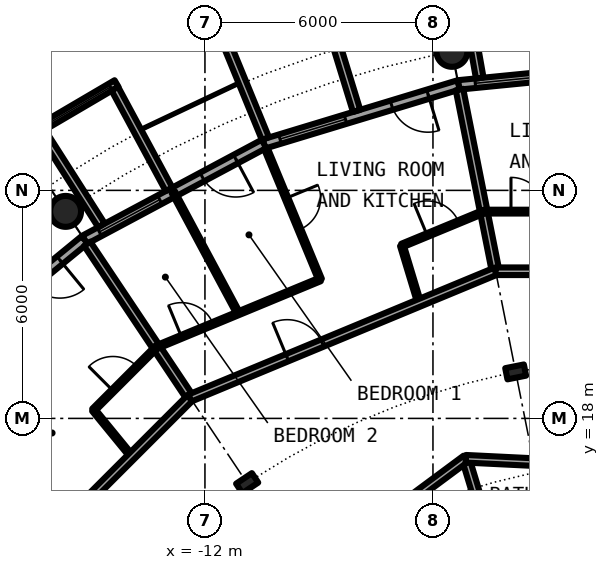
"""IFC4 building model, lengths in metres.
Left out: names, types, materials, properties, quantities, classifications, styles, units other than length and angle.
Written with IfcOpenShell. Run it as: python <this file> out.ifc"""

import sys

from ifc_helpers import new_model, si_unit, direction, frame, frame_2d, origin, origin_2d, place, context, subcontext, project, spatial, rectangle, circle, hollow_circle, i_section, extrude, element, fill, save


model = new_model("IFC4")
c1 = context("Model", 3, precision=1e-05, world=origin(), true_north=direction((0.0, 1.0)))
c2 = subcontext(c1, "Body", "Model", "MODEL_VIEW")
j1 = project(units=[si_unit("LENGTHUNIT", "METRE"), si_unit("PLANEANGLEUNIT", "RADIAN")], contexts=[c1])
p1 = place(None, origin())
s1 = spatial("IfcSite", under=j1, at=p1, CompositionType="ELEMENT")
p2 = place(p1, origin())
s2 = spatial("IfcBuilding", under=s1, at=p2, CompositionType="ELEMENT")
p3 = place(p2, frame((0.0, 0.0, 170.75)))
s3 = spatial("IfcBuildingStorey", under=s2, at=p3, CompositionType="ELEMENT", Elevation=170.75)
for number, where, z_axis, x_axis in (
    (1, (-5.501, 27.658, 0.0), (0.0, 0.0, 1.0), (1.0, 0.0, 0.0)),
    (2, (-15.667, 23.448, 0.0), (0.0, 0.0, 1.0), (1.0, 0.0, 0.0)),
):
    element("IfcColumn", number, at=place(p3, frame(where, z_axis=z_axis, x_axis=x_axis)), inside=s3, PredefinedType="COLUMN", context=c2, shape_type="SweptSolid", body=[
        extrude(hollow_circle(Radius=0.406, WallThickness=0.04, at=origin_2d()), origin(), (0.0, 0.0, 1.0), 3.05),
    ])
for number, where, z_axis, x_axis in (
    (3, (-3.824, 19.223, 0.0), (0.0, 0.0, 1.0), (-0.195, 0.981, 0.0)),
    (4, (-10.889, 16.297, 0.0), (0.0, 0.0, 1.0), (-0.556, 0.831, 0.0)),
):
    element("IfcColumn", number, at=place(p3, frame(where, z_axis=z_axis, x_axis=x_axis)), inside=s3, PredefinedType="COLUMN", context=c2, shape_type="SweptSolid", body=[
        extrude(i_section(OverallWidth=0.3, OverallDepth=0.5, WebThickness=0.014, FlangeThickness=0.028, FilletRadius=0.027, at=origin_2d()), origin(), (0.0, 0.0, 1.0), 3.05),
    ])
p4 = place(p3, frame((0.0, 27.3, 0.0), z_axis=(0.0, 0.0, 1.0), x_axis=(-0.995173996315, -0.098126026407, 0.0)))
e5 = element("IfcWall", 5, at=p4, inside=s3, PredefinedType="SOLIDWALL", context=c2, shape_type="SweptSolid", body=[
    extrude(rectangle(XDim=5.352, YDim=0.25, at=frame_2d((2.676, 0.0))), origin(), (0.0, 0.0, 1.0), 2.7),
])
p5 = place(p4, frame((0.841, 0.0, 0.0)))
e6 = element("IfcOpeningElement", 6, at=p5, cuts=e5, PredefinedType="OPENING", context=c2, shape_type="SweptSolid", body=[
    extrude(rectangle(XDim=1.0, YDim=2.2, at=frame_2d((0.5, 1.1))), frame((0.0, 0.135, 0.0), z_axis=(0.0, -1.0, 0.0), x_axis=(1.0, 0.0, 0.0)), (0.0, 0.0, 1.0), 0.27),
])
p6 = place(p4, frame((3.111, 0.0, 0.3)))
e7 = element("IfcOpeningElement", 7, at=p6, cuts=e5, PredefinedType="OPENING", context=c2, shape_type="SweptSolid", body=[
    extrude(rectangle(XDim=1.8, YDim=2.1, at=frame_2d((0.9, 1.05))), frame((0.0, 0.135, 0.0), z_axis=(0.0, -1.0, 0.0), x_axis=(1.0, 0.0, 0.0)), (0.0, 0.0, 1.0), 0.27),
])
p7 = place(p3, frame((-4.769, 26.956, -0.03), z_axis=(0.0, 0.0, 1.0), x_axis=(-0.174056778901, 0.984735618183, 0.0)))
e8 = element("IfcWall", 8, at=p7, inside=s3, PredefinedType="SOLIDWALL", context=c2, shape_type="SweptSolid", body=[
    extrude(rectangle(XDim=2.925, YDim=0.2, at=frame_2d((1.462, 0.0))), origin(), (0.0, 0.0, 1.0), 2.73),
])
p8 = place(p3, frame((-5.326, 26.775, 0.0), z_axis=(0.0, 0.0, 1.0), x_axis=(-0.956965678721, -0.290201119486, 0.0)))
e9 = element("IfcWall", 9, at=p8, inside=s3, PredefinedType="SOLIDWALL", context=c2, shape_type="SweptSolid", body=[
    extrude(rectangle(XDim=5.351, YDim=0.25, at=frame_2d((2.676, 0.0))), origin(), (0.0, 0.0, 1.0), 2.7),
])
p9 = place(p8, frame((0.841, 0.0, 0.0)))
e10 = element("IfcOpeningElement", 10, at=p9, cuts=e9, PredefinedType="OPENING", context=c2, shape_type="SweptSolid", body=[
    extrude(rectangle(XDim=1.0, YDim=2.2, at=frame_2d((0.5, 1.1))), frame((0.0, 0.135, 0.0), z_axis=(0.0, -1.0, 0.0), x_axis=(1.0, 0.0, 0.0)), (0.0, 0.0, 1.0), 0.27),
])
p10 = place(p8, frame((3.111, 0.0, 0.3)))
e11 = element("IfcOpeningElement", 11, at=p10, cuts=e9, PredefinedType="OPENING", context=c2, shape_type="SweptSolid", body=[
    extrude(rectangle(XDim=1.8, YDim=2.1, at=frame_2d((0.9, 1.05))), frame((0.0, 0.135, 0.0), z_axis=(0.0, -1.0, 0.0), x_axis=(1.0, 0.0, 0.0)), (0.0, 0.0, 1.0), 0.27),
])
p11 = place(p3, frame((-8.009, 26.092, -0.03), z_axis=(0.0, 0.0, 1.0), x_axis=(-0.293406695073, 0.955987715029, 0.0)))
e12 = element("IfcWall", 12, at=p11, inside=s3, PredefinedType="SOLIDWALL", context=c2, shape_type="SweptSolid", body=[
    extrude(rectangle(XDim=3.006, YDim=0.2, at=frame_2d((1.503, 0.0))), origin(), (0.0, 0.0, 1.0), 2.73),
])
p12 = place(p3, frame((-10.409, 25.364, -0.03), z_axis=(0.0, 0.0, 1.0), x_axis=(-0.379509886562, 0.925187681501, 0.0)))
e13 = element("IfcWall", 13, at=p12, inside=s3, PredefinedType="SOLIDWALL", context=c2, shape_type="SweptSolid", body=[
    extrude(rectangle(XDim=2.883, YDim=0.2, at=frame_2d((1.441, 0.0))), origin(), (0.0, 0.0, 1.0), 2.73),
])
p13 = place(p3, frame((-10.447, 25.222, 0.0), z_axis=(0.0, 0.0, 1.0), x_axis=(-0.881915646801, -0.471407246368, 0.0)))
e14 = element("IfcWall", 14, at=p13, inside=s3, PredefinedType="SOLIDWALL", context=c2, shape_type="SweptSolid", body=[
    extrude(rectangle(XDim=5.352, YDim=0.25, at=frame_2d((2.676, 0.0))), origin(), (0.0, 0.0, 1.0), 2.7),
])
p14 = place(p13, frame((0.841, 0.0, 0.0)))
e15 = element("IfcOpeningElement", 15, at=p14, cuts=e14, PredefinedType="OPENING", context=c2, shape_type="SweptSolid", body=[
    extrude(rectangle(XDim=1.0, YDim=2.2, at=frame_2d((0.5, 1.1))), frame((0.0, 0.135, 0.0), z_axis=(0.0, -1.0, 0.0), x_axis=(1.0, 0.0, 0.0)), (0.0, 0.0, 1.0), 0.27),
])
p15 = place(p13, frame((3.111, 0.0, 0.3)))
e16 = element("IfcOpeningElement", 16, at=p15, cuts=e14, PredefinedType="OPENING", context=c2, shape_type="SweptSolid", body=[
    extrude(rectangle(XDim=1.8, YDim=2.1, at=frame_2d((0.9, 1.05))), frame((0.0, 0.135, 0.0), z_axis=(0.0, -1.0, 0.0), x_axis=(1.0, 0.0, 0.0)), (0.0, 0.0, 1.0), 0.27),
])
p16 = place(p3, frame((-14.327, 26.812, -0.03), z_axis=(0.0, 0.0, 1.0), x_axis=(-0.862403467503, -0.506221551535, 0.0)))
e17 = element("IfcWall", 17, at=p16, inside=s3, PredefinedType="SOLIDWALL", context=c2, shape_type="SweptSolid", body=[
    extrude(rectangle(XDim=2.446, YDim=0.2, at=frame_2d((1.223, 0.0))), origin(), (0.0, 0.0, 1.0), 2.73),
])
p17 = place(p16, frame((0.183, 0.0, 0.33)))
e18 = element("IfcOpeningElement", 18, at=p17, cuts=e17, PredefinedType="OPENING", context=c2, shape_type="SweptSolid", body=[
    extrude(circle(Radius=1.04, at=frame_2d((1.04, 1.04))), frame((0.0, 0.11, 0.0), z_axis=(0.0, -1.0, 0.0), x_axis=(1.0, 0.0, 0.0)), (0.0, 0.0, 1.0), 0.22),
])
p18 = place(p3, frame((-12.945, 24.029, -0.03), z_axis=(0.0, 0.0, 1.0), x_axis=(-0.474424310775, 0.88029629861, 0.0)))
e19 = element("IfcWall", 19, at=p18, inside=s3, PredefinedType="SOLIDWALL", context=c2, shape_type="SweptSolid", body=[
    extrude(rectangle(XDim=3.006, YDim=0.2, at=frame_2d((1.503, 0.0))), origin(), (0.0, 0.0, 1.0), 2.73),
])
p19 = place(p3, frame((-14.722, 23.079, -0.03), z_axis=(0.0, 0.0, 1.0), x_axis=(-0.537572179146, 0.843217737129, 0.0)))
e20 = element("IfcWall", 20, at=p19, inside=s3, PredefinedType="SOLIDWALL", context=c2, shape_type="SweptSolid", body=[
    extrude(rectangle(XDim=2.924, YDim=0.2, at=frame_2d((1.462, 0.0))), origin(), (0.0, 0.0, 1.0), 2.73),
])
p20 = place(p3, frame((-15.167, 22.699, 0.0), z_axis=(0.0, 0.0, 1.0), x_axis=(-0.773019449054, -0.634382322723, 0.0)))
e21 = element("IfcWall", 21, at=p20, inside=s3, PredefinedType="SOLIDWALL", context=c2, shape_type="SweptSolid", body=[
    extrude(rectangle(XDim=5.352, YDim=0.25, at=frame_2d((2.676, 0.0))), origin(), (0.0, 0.0, 1.0), 2.7),
])
p21 = place(p20, frame((0.841, 0.0, 0.0)))
e22 = element("IfcOpeningElement", 22, at=p21, cuts=e21, PredefinedType="OPENING", context=c2, shape_type="SweptSolid", body=[
    extrude(rectangle(XDim=1.0, YDim=2.2, at=frame_2d((0.5, 1.1))), frame((0.0, 0.135, 0.0), z_axis=(0.0, -1.0, 0.0), x_axis=(1.0, 0.0, 0.0)), (0.0, 0.0, 1.0), 0.27),
])
p22 = place(p20, frame((3.111, 0.0, 0.3)))
e23 = element("IfcOpeningElement", 23, at=p22, cuts=e21, PredefinedType="OPENING", context=c2, shape_type="SweptSolid", body=[
    extrude(rectangle(XDim=1.8, YDim=2.1, at=frame_2d((0.9, 1.05))), frame((0.0, 0.135, 0.0), z_axis=(0.0, -1.0, 0.0), x_axis=(1.0, 0.0, 0.0)), (0.0, 0.0, 1.0), 0.27),
])
p23 = place(p3, frame((-15.098, 22.595, 0.0), z_axis=(0.0, 0.0, 1.0), x_axis=(0.55569370664, -0.831387096605, 0.0)))
e24 = element("IfcWall", 24, at=p23, inside=s3, PredefinedType="PARTITIONING", context=c2, shape_type="SweptSolid", body=[
    extrude(rectangle(XDim=4.875, YDim=0.2, at=frame_2d((2.438, 0.0))), origin(), (0.0, 0.0, 1.0), 2.7),
])
p24 = place(p3, frame((-14.93, 18.222, 0.0), z_axis=(0.0, 0.0, 1.0), x_axis=(0.633633636523, -0.773633255921, 0.0)))
e25 = element("IfcWall", 25, at=p24, inside=s3, PredefinedType="PARTITIONING", context=c2, shape_type="SweptSolid", body=[
    extrude(rectangle(XDim=1.578, YDim=0.1, at=frame_2d((0.789, 0.0))), origin(), (0.0, 0.0, 1.0), 2.7),
])
p25 = place(p3, frame((-12.833, 23.954, 0.0), z_axis=(0.0, 0.0, 1.0), x_axis=(0.472212052488, -0.881484984265, 0.0)))
e26 = element("IfcWall", 26, at=p25, inside=s3, PredefinedType="PARTITIONING", context=c2, shape_type="SweptSolid", body=[
    extrude(rectangle(XDim=3.619, YDim=0.1, at=frame_2d((1.81, 0.0))), origin(), (0.0, 0.0, 1.0), 2.7),
])
p26 = place(p3, frame((-10.399, 25.106, 0.0), z_axis=(0.0, 0.0, 1.0), x_axis=(0.382669377748, -0.923885353999, 0.0)))
e27 = element("IfcWall", 27, at=p26, inside=s3, PredefinedType="PARTITIONING", context=c2, shape_type="SweptSolid", body=[
    extrude(rectangle(XDim=3.734, YDim=0.1, at=frame_2d((1.867, 0.0))), origin(), (0.0, 0.0, 1.0), 2.7),
])
p27 = place(p26, frame((1.417, 0.0, 0.0)))
e28 = element("IfcOpeningElement", 28, at=p27, cuts=e27, PredefinedType="OPENING", context=c2, shape_type="SweptSolid", body=[
    extrude(rectangle(XDim=0.9, YDim=2.3, at=frame_2d((0.45, 1.15))), frame((0.0, 0.06, 0.0), z_axis=(0.0, -1.0, 0.0), x_axis=(1.0, 0.0, 0.0)), (0.0, 0.0, 1.0), 0.12),
])
p28 = place(p3, frame((-6.818, 22.549, 0.0), z_axis=(0.0, 0.0, 1.0), x_axis=(0.289689552287, -0.957120662872, 0.0)))
e29 = element("IfcWall", 29, at=p28, inside=s3, PredefinedType="PARTITIONING", context=c2, shape_type="SweptSolid", body=[
    extrude(rectangle(XDim=1.578, YDim=0.1, at=frame_2d((0.789, 0.0))), origin(), (0.0, 0.0, 1.0), 2.7),
])
p29 = place(p3, frame((-5.302, 26.653, 0.0), z_axis=(0.0, 0.0, 1.0), x_axis=(0.195075825861, -0.980788163756, 0.0)))
e30 = element("IfcWall", 30, at=p29, inside=s3, PredefinedType="PARTITIONING", context=c2, shape_type="SweptSolid", body=[
    extrude(rectangle(XDim=4.875, YDim=0.2, at=frame_2d((2.438, 0.0))), origin(), (0.0, 0.0, 1.0), 2.7),
])
p30 = place(p3, frame((-5.14, 16.937, 0.0), z_axis=(0.0, 0.0, 1.0), x_axis=(0.290401199794, -0.956904981259, 0.0)))
e31 = element("IfcWall", 31, at=p30, inside=s3, PredefinedType="PARTITIONING", context=c2, shape_type="SweptSolid", body=[
    extrude(rectangle(XDim=9.979, YDim=0.2, at=frame_2d((4.99, 0.0))), origin(), (0.0, 0.0, 1.0), 2.7),
])
p31 = place(p3, frame((-13.349, 10.848, 0.0), z_axis=(0.0, 0.0, 1.0), x_axis=(0.803229232922, 0.595670042371, 0.0)))
e32 = element("IfcWall", 32, at=p31, inside=s3, PredefinedType="PARTITIONING", context=c2, shape_type="SweptSolid", body=[
    extrude(rectangle(XDim=10.224, YDim=0.2, at=frame_2d((5.112, 0.0))), origin(), (0.0, 0.0, 1.0), 2.7),
])
p32 = place(p31, frame((4.612, 0.0, 0.0)))
e33 = element("IfcOpeningElement", 33, at=p32, cuts=e32, PredefinedType="OPENING", context=c2, shape_type="SweptSolid", body=[
    extrude(rectangle(XDim=1.0, YDim=2.3, at=frame_2d((0.5, 1.15))), frame((0.0, 0.11, 0.0), z_axis=(0.0, -1.0, 0.0), x_axis=(1.0, 0.0, 0.0)), (0.0, 0.0, 1.0), 0.22),
])
p33 = place(p3, frame((-5.137, 16.938, 0.0), z_axis=(0.0, 0.0, 1.0), x_axis=(0.99879704719, -0.04903527836, 0.0)))
e34 = element("IfcWall", 34, at=p33, inside=s3, PredefinedType="PARTITIONING", context=c2, shape_type="SweptSolid", body=[
    extrude(rectangle(XDim=11.929, YDim=0.2, at=frame_2d((5.965, 0.0))), origin(), (0.0, 0.0, 1.0), 2.7),
])
p34 = place(p33, frame((4.608, 0.0, 0.0)))
e35 = element("IfcOpeningElement", 35, at=p34, cuts=e34, PredefinedType="OPENING", context=c2, shape_type="SweptSolid", body=[
    extrude(rectangle(XDim=1.0, YDim=2.3, at=frame_2d((0.5, 1.15))), frame((0.0, 0.11, 0.0), z_axis=(0.0, -1.0, 0.0), x_axis=(1.0, 0.0, 0.0)), (0.0, 0.0, 1.0), 0.22),
])
p35 = place(p3, frame((-18.542, 12.389, 0.0), z_axis=(0.0, 0.0, 1.0), x_axis=(0.707106781187, 0.707106781187, 0.0)))
e36 = element("IfcWall", 36, at=p35, inside=s3, PredefinedType="PARTITIONING", context=c2, shape_type="SweptSolid", body=[
    extrude(rectangle(XDim=8.702, YDim=0.2, at=frame_2d((4.351, 0.0))), origin(), (0.0, 0.0, 1.0), 2.7),
])
p36 = place(p35, frame((2.763, 0.0, 0.0)))
e37 = element("IfcOpeningElement", 37, at=p36, cuts=e36, PredefinedType="OPENING", context=c2, shape_type="SweptSolid", body=[
    extrude(rectangle(XDim=1.0, YDim=2.3, at=frame_2d((0.5, 1.15))), frame((0.0, 0.11, 0.0), z_axis=(0.0, -1.0, 0.0), x_axis=(1.0, 0.0, 0.0)), (0.0, 0.0, 1.0), 0.22),
])
p37 = place(p3, frame((-12.396, 18.536, 0.0), z_axis=(0.0, 0.0, 1.0), x_axis=(0.923722518166, 0.383062278792, 0.0)))
e38 = element("IfcWall", 38, at=p37, inside=s3, PredefinedType="PARTITIONING", context=c2, shape_type="SweptSolid", body=[
    extrude(rectangle(XDim=8.709, YDim=0.2, at=frame_2d((4.354, 0.0))), origin(), (0.0, 0.0, 1.0), 2.7),
])
p38 = place(p37, frame((2.772, 0.0, 0.0)))
e39 = element("IfcOpeningElement", 39, at=p38, cuts=e38, PredefinedType="OPENING", context=c2, shape_type="SweptSolid", body=[
    extrude(rectangle(XDim=1.0, YDim=2.3, at=frame_2d((0.5, 1.15))), frame((0.0, 0.11, 0.0), z_axis=(0.0, -1.0, 0.0), x_axis=(1.0, 0.0, 0.0)), (0.0, 0.0, 1.0), 0.22),
])
p39 = place(p3, frame((-4.351, 21.872, 0.0), z_axis=(0.0, 0.0, 1.0), x_axis=(1.0, 0.0, 0.0)))
e40 = element("IfcWall", 40, at=p39, inside=s3, PredefinedType="PARTITIONING", context=c2, shape_type="SweptSolid", body=[
    extrude(rectangle(XDim=8.702, YDim=0.2, at=frame_2d((4.351, 0.0))), origin(), (0.0, 0.0, 1.0), 2.7),
])
p40 = place(p39, frame((4.939, 0.0, 0.0)))
e41 = element("IfcOpeningElement", 41, at=p40, cuts=e40, PredefinedType="OPENING", context=c2, shape_type="SweptSolid", body=[
    extrude(rectangle(XDim=1.0, YDim=2.3, at=frame_2d((0.5, 1.15))), frame((0.0, 0.11, 0.0), z_axis=(0.0, -1.0, 0.0), x_axis=(1.0, 0.0, 0.0)), (0.0, 0.0, 1.0), 0.22),
])
p41 = place(p3, frame((-14.932, 18.218, 0.0), z_axis=(0.0, 0.0, 1.0), x_axis=(0.707106781187, 0.707106781187, 0.0)))
e42 = element("IfcWall", 42, at=p41, inside=s3, PredefinedType="PARTITIONING", context=c2, shape_type="SweptSolid", body=[
    extrude(rectangle(XDim=2.332, YDim=0.1, at=frame_2d((1.166, 0.0))), origin(), (0.0, 0.0, 1.0), 2.7),
])
p42 = place(p41, frame((0.723, 0.0, 0.0)))
e43 = element("IfcOpeningElement", 43, at=p42, cuts=e42, PredefinedType="OPENING", context=c2, shape_type="SweptSolid", body=[
    extrude(rectangle(XDim=0.9, YDim=2.3, at=frame_2d((0.45, 1.15))), frame((0.0, 0.06, 0.0), z_axis=(0.0, -1.0, 0.0), x_axis=(1.0, 0.0, 0.0)), (0.0, 0.0, 1.0), 0.12),
])
p43 = place(p3, frame((-13.278, 19.872, 0.0), z_axis=(0.0, 0.0, 1.0), x_axis=(0.923920484476, 0.38258455061, 0.0)))
e44 = element("IfcWall", 44, at=p43, inside=s3, PredefinedType="PARTITIONING", context=c2, shape_type="SweptSolid", body=[
    extrude(rectangle(XDim=4.663, YDim=0.1, at=frame_2d((2.332, 0.0))), origin(), (0.0, 0.0, 1.0), 2.7),
])
p44 = place(p43, frame((0.716, 0.0, 0.0)))
e45 = element("IfcOpeningElement", 45, at=p44, cuts=e44, PredefinedType="OPENING", context=c2, shape_type="SweptSolid", body=[
    extrude(rectangle(XDim=0.9, YDim=2.3, at=frame_2d((0.45, 1.15))), frame((0.0, 0.06, 0.0), z_axis=(0.0, -1.0, 0.0), x_axis=(1.0, 0.0, 0.0)), (0.0, 0.0, 1.0), 0.12),
])
p45 = place(p3, frame((-6.817, 22.548, 0.0), z_axis=(0.0, 0.0, 1.0), x_axis=(0.924061443507, 0.382243964798, 0.0)))
e46 = element("IfcWall", 46, at=p45, inside=s3, PredefinedType="PARTITIONING", context=c2, shape_type="SweptSolid", body=[
    extrude(rectangle(XDim=2.333, YDim=0.1, at=frame_2d((1.167, 0.0))), origin(), (0.0, 0.0, 1.0), 2.7),
])
p46 = place(p45, frame((0.717, 0.0, 0.0)))
e47 = element("IfcOpeningElement", 47, at=p46, cuts=e46, PredefinedType="OPENING", context=c2, shape_type="SweptSolid", body=[
    extrude(rectangle(XDim=0.9, YDim=2.3, at=frame_2d((0.45, 1.15))), frame((0.0, 0.06, 0.0), z_axis=(0.0, -1.0, 0.0), x_axis=(1.0, 0.0, 0.0)), (0.0, 0.0, 1.0), 0.12),
])
p47 = place(p3, frame((-4.663, 23.441, 0.0), z_axis=(0.0, 0.0, 1.0), x_axis=(1.0, 0.0, 0.0)))
e48 = element("IfcWall", 48, at=p47, inside=s3, PredefinedType="PARTITIONING", context=c2, shape_type="SweptSolid", body=[
    extrude(rectangle(XDim=2.332, YDim=0.1, at=frame_2d((1.166, 0.0))), origin(), (0.0, 0.0, 1.0), 2.7),
])
p48 = place(p47, frame((0.716, 0.0, 0.0)))
e49 = element("IfcOpeningElement", 49, at=p48, cuts=e48, PredefinedType="OPENING", context=c2, shape_type="SweptSolid", body=[
    extrude(rectangle(XDim=0.9, YDim=2.3, at=frame_2d((0.45, 1.15))), frame((0.0, 0.06, 0.0), z_axis=(0.0, -1.0, 0.0), x_axis=(1.0, 0.0, 0.0)), (0.0, 0.0, 1.0), 0.12),
])
p49 = place(p6, origin())
e50 = element("IfcWindow", 50, at=p49, inside=s3, PartitioningType="SINGLE_PANEL", PredefinedType="WINDOW", context=c2, shape_type="SweptSolid", body=[
    extrude(rectangle(XDim=1.8, YDim=2.1, at=frame_2d((0.9, 1.05))), frame((0.0, 0.03, 0.0), z_axis=(0.0, -1.0, 0.0), x_axis=(1.0, 0.0, 0.0)), (0.0, 0.0, 1.0), 0.06),
])
fill(e7, e50)
p50 = place(p9, origin())
e51 = element("IfcDoor", 51, at=p50, inside=s3, OperationType="SINGLE_SWING_LEFT", PredefinedType="DOOR", context=c2, shape_type="SweptSolid", body=[
    extrude(rectangle(XDim=1.0, YDim=2.2, at=frame_2d((0.5, 1.1))), frame((0.0, 0.025, 0.0), z_axis=(0.0, -1.0, 0.0), x_axis=(1.0, 0.0, 0.0)), (0.0, 0.0, 1.0), 0.05),
])
fill(e10, e51)
p51 = place(p10, origin())
e52 = element("IfcWindow", 52, at=p51, inside=s3, PartitioningType="SINGLE_PANEL", PredefinedType="WINDOW", context=c2, shape_type="SweptSolid", body=[
    extrude(rectangle(XDim=1.8, YDim=2.1, at=frame_2d((0.9, 1.05))), frame((0.0, 0.03, 0.0), z_axis=(0.0, -1.0, 0.0), x_axis=(1.0, 0.0, 0.0)), (0.0, 0.0, 1.0), 0.06),
])
fill(e11, e52)
p52 = place(p14, origin())
e53 = element("IfcDoor", 53, at=p52, inside=s3, OperationType="SINGLE_SWING_LEFT", PredefinedType="DOOR", context=c2, shape_type="SweptSolid", body=[
    extrude(rectangle(XDim=1.0, YDim=2.2, at=frame_2d((0.5, 1.1))), frame((0.0, 0.025, 0.0), z_axis=(0.0, -1.0, 0.0), x_axis=(1.0, 0.0, 0.0)), (0.0, 0.0, 1.0), 0.05),
])
fill(e15, e53)
p53 = place(p15, origin())
e54 = element("IfcWindow", 54, at=p53, inside=s3, PartitioningType="SINGLE_PANEL", PredefinedType="WINDOW", context=c2, shape_type="SweptSolid", body=[
    extrude(rectangle(XDim=1.8, YDim=2.1, at=frame_2d((0.9, 1.05))), frame((0.0, 0.03, 0.0), z_axis=(0.0, -1.0, 0.0), x_axis=(1.0, 0.0, 0.0)), (0.0, 0.0, 1.0), 0.06),
])
fill(e16, e54)
p54 = place(p17, origin())
e55 = element("IfcWindow", 55, at=p54, inside=s3, PartitioningType="SINGLE_PANEL", PredefinedType="WINDOW", context=c2, shape_type="SweptSolid", body=[
    extrude(circle(Radius=1.04, at=frame_2d((1.04, 1.04))), frame((0.0, 0.03, 0.0), z_axis=(0.0, -1.0, 0.0), x_axis=(1.0, 0.0, 0.0)), (0.0, 0.0, 1.0), 0.06),
])
fill(e18, e55)
p55 = place(p21, origin())
e56 = element("IfcDoor", 56, at=p55, inside=s3, OperationType="SINGLE_SWING_LEFT", PredefinedType="DOOR", context=c2, shape_type="SweptSolid", body=[
    extrude(rectangle(XDim=1.0, YDim=2.2, at=frame_2d((0.5, 1.1))), frame((0.0, 0.025, 0.0), z_axis=(0.0, -1.0, 0.0), x_axis=(1.0, 0.0, 0.0)), (0.0, 0.0, 1.0), 0.05),
])
fill(e22, e56)
p56 = place(p48, origin())
e57 = element("IfcDoor", 57, at=p56, inside=s3, OperationType="SINGLE_SWING_RIGHT", PredefinedType="DOOR", context=c2, shape_type="SweptSolid", body=[
    extrude(rectangle(XDim=0.9, YDim=2.3, at=frame_2d((0.45, 1.15))), frame((0.0, 0.025, 0.0), z_axis=(0.0, -1.0, 0.0), x_axis=(1.0, 0.0, 0.0)), (0.0, 0.0, 1.0), 0.05),
])
fill(e49, e57)
p57 = place(p38, origin())
e58 = element("IfcDoor", 58, at=p57, inside=s3, OperationType="SINGLE_SWING_LEFT", PredefinedType="DOOR", context=c2, shape_type="SweptSolid", body=[
    extrude(rectangle(XDim=1.0, YDim=2.3, at=frame_2d((0.5, 1.15))), frame((0.0, 0.025, 0.0), z_axis=(0.0, -1.0, 0.0), x_axis=(1.0, 0.0, 0.0)), (0.0, 0.0, 1.0), 0.05),
])
fill(e39, e58)
p58 = place(p46, origin())
e59 = element("IfcDoor", 59, at=p58, inside=s3, OperationType="SINGLE_SWING_RIGHT", PredefinedType="DOOR", context=c2, shape_type="SweptSolid", body=[
    extrude(rectangle(XDim=0.9, YDim=2.3, at=frame_2d((0.45, 1.15))), frame((0.0, 0.025, 0.0), z_axis=(0.0, -1.0, 0.0), x_axis=(1.0, 0.0, 0.0)), (0.0, 0.0, 1.0), 0.05),
])
fill(e47, e59)
p59 = place(p27, origin())
e60 = element("IfcDoor", 60, at=p59, inside=s3, OperationType="SINGLE_SWING_RIGHT", PredefinedType="DOOR", context=c2, shape_type="SweptSolid", body=[
    extrude(rectangle(XDim=0.9, YDim=2.3, at=frame_2d((0.45, 1.15))), frame((0.0, 0.025, 0.0), z_axis=(0.0, -1.0, 0.0), x_axis=(1.0, 0.0, 0.0)), (0.0, 0.0, 1.0), 0.05),
])
fill(e28, e60)
p60 = place(p44, origin())
e61 = element("IfcDoor", 61, at=p60, inside=s3, OperationType="SINGLE_SWING_LEFT", PredefinedType="DOOR", context=c2, shape_type="SweptSolid", body=[
    extrude(rectangle(XDim=0.9, YDim=2.3, at=frame_2d((0.45, 1.15))), frame((0.0, 0.025, 0.0), z_axis=(0.0, -1.0, 0.0), x_axis=(1.0, 0.0, 0.0)), (0.0, 0.0, 1.0), 0.05),
])
fill(e45, e61)
p61 = place(p42, origin())
e62 = element("IfcDoor", 62, at=p61, inside=s3, OperationType="SINGLE_SWING_RIGHT", PredefinedType="DOOR", context=c2, shape_type="SweptSolid", body=[
    extrude(rectangle(XDim=0.9, YDim=2.3, at=frame_2d((0.45, 1.15))), frame((0.0, 0.025, 0.0), z_axis=(0.0, -1.0, 0.0), x_axis=(1.0, 0.0, 0.0)), (0.0, 0.0, 1.0), 0.05),
])
fill(e43, e62)
save(model, sys.argv[1])
